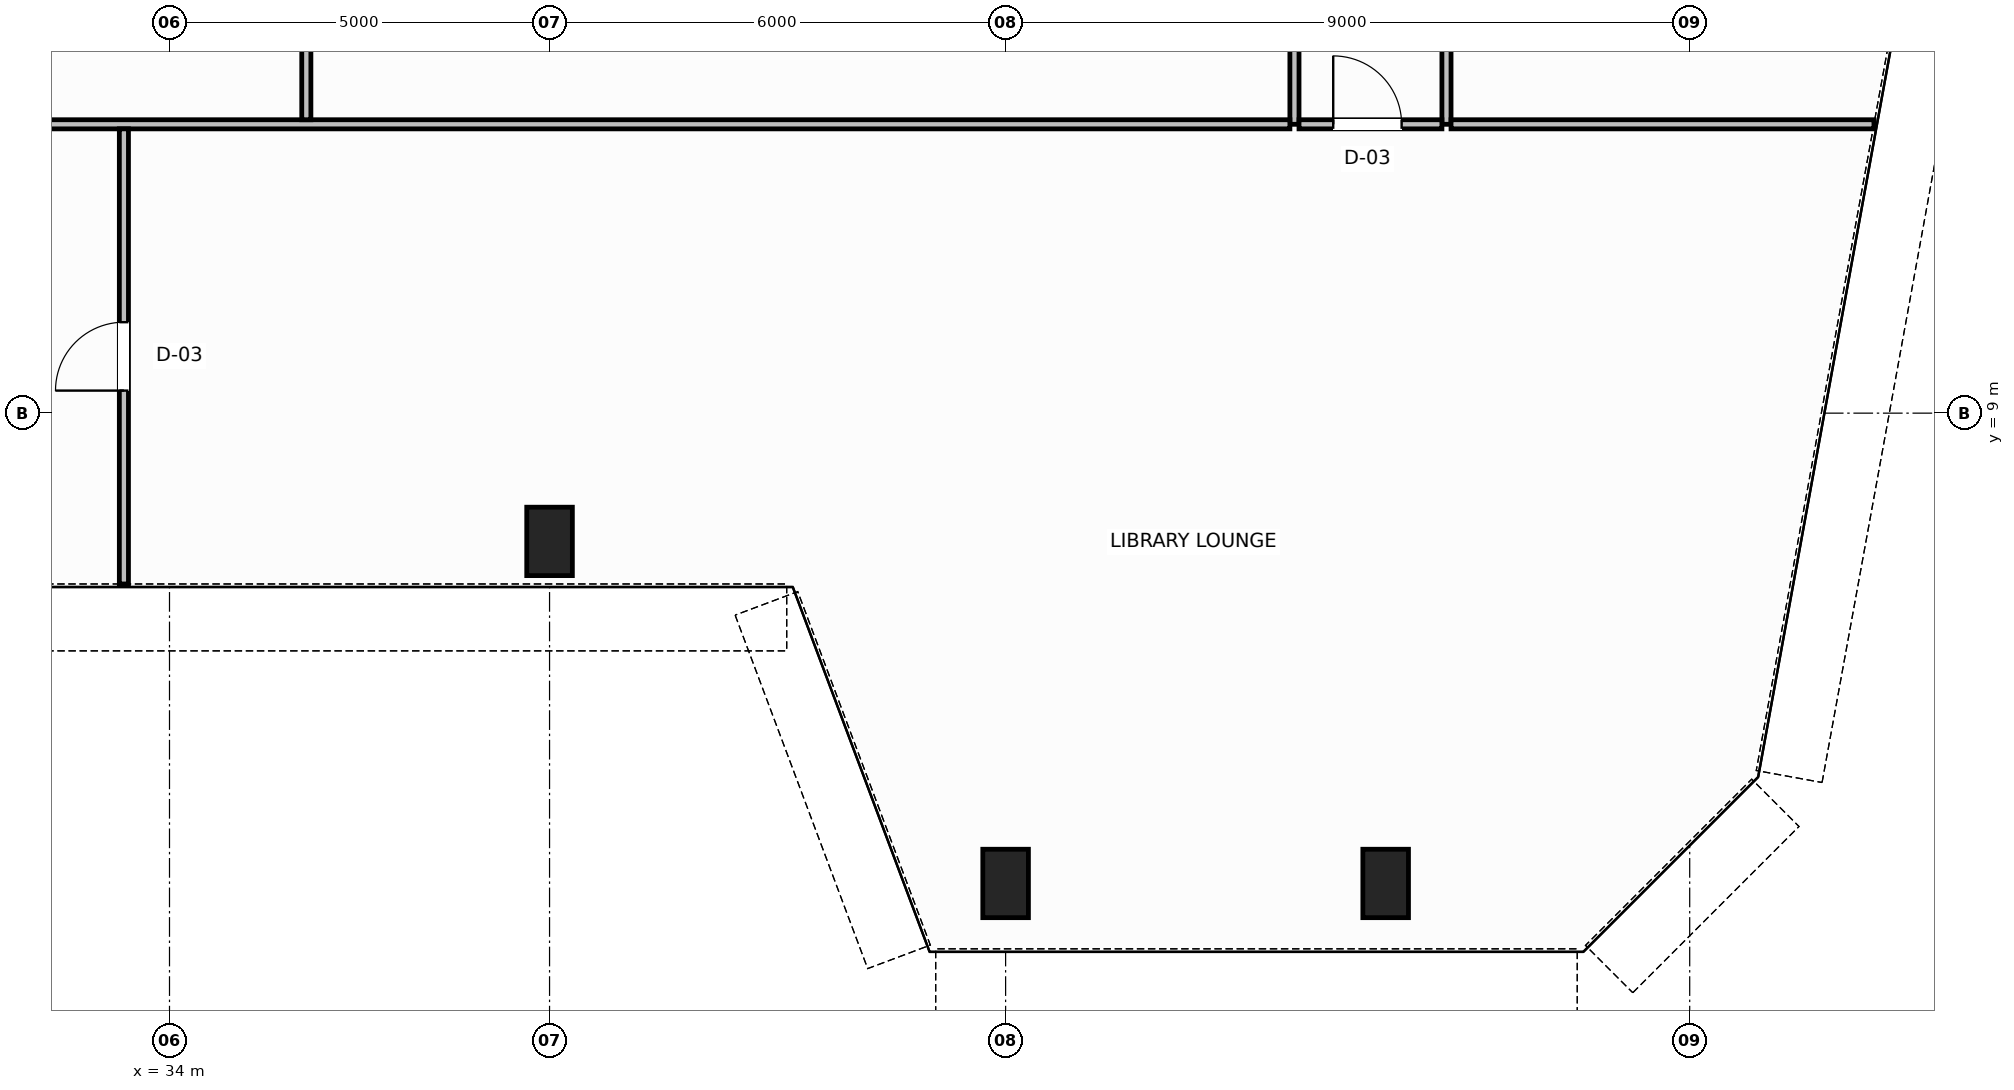
"""IFC4 building model, lengths in metres.
Left out: names, types, materials, properties, quantities, classifications, styles, units other than length and angle.
Written with IfcOpenShell. Run it as: python <this file> out.ifc"""

import sys

from ifc_helpers import new_model, si_unit, direction, frame, frame_2d, origin, origin_2d, place, context, subcontext, project, spatial, rectangle, hollow_rectangle, extrude, source, transform, mapped, element, fill, save


model = new_model("IFC4")
c1 = context("Model", 3, precision=1e-05, world=origin(), true_north=direction((0.0, 1.0)))
c2 = subcontext(c1, "Body", "Model", "MODEL_VIEW")
j1 = project(units=[si_unit("LENGTHUNIT", "METRE"), si_unit("PLANEANGLEUNIT", "RADIAN")], contexts=[c1])
p1 = place(None, origin())
s1 = spatial("IfcSite", under=j1, at=p1, CompositionType="ELEMENT")
p2 = place(p1, origin())
s2 = spatial("IfcBuilding", under=s1, at=p2, CompositionType="ELEMENT")
p3 = place(p2, frame((0.0, 0.0, 49.2)))
s3 = spatial("IfcBuildingStorey", under=s2, at=p3, CompositionType="ELEMENT", Elevation=49.2)
m1 = source(origin(), c2, "Body", "SweptSolid", [
    extrude(hollow_rectangle(XDim=0.6, YDim=0.9, WallThickness=0.04, InnerFilletRadius=0.04, OuterFilletRadius=0.08, at=origin_2d()), origin(), (0.0, 0.0, 1.0), 3.744),
])
for number, where, z_axis, x_axis in (
    (1, (39.0, 7.312, 0.032), (0.0, 0.064, 0.998), (-1.0, 0.0, 0.0)),
    (2, (45.0, 2.812, 0.032), (0.0, 0.064, 0.998), (-1.0, 0.0, 0.0)),
    (3, (50.0, 2.812, 0.032), (0.0, 0.064, 0.998), (-1.0, 0.0, 0.0)),
):
    element("IfcColumn", number, at=place(p3, frame(where, z_axis=z_axis, x_axis=x_axis)), inside=s3, PredefinedType="COLUMN", context=c2, shape_type="MappedRepresentation", body=[
        mapped(m1, transform((0.0, 0.0, 0.0), scale=1.0)),
    ])
p4 = place(p3, frame((48.8, 12.8, 0.0), z_axis=(0.0, 0.0, 1.0), x_axis=(0.0, 1.0, 0.0)))
e4 = element("IfcWall", 4, at=p4, inside=s3, PredefinedType="PARTITIONING", context=c2, shape_type="SweptSolid", body=[
    extrude(rectangle(XDim=21.24, YDim=0.12, at=frame_2d((10.62, 0.0))), origin(), (0.0, 0.0, 1.0), 3.58),
])
p5 = place(p3, frame((50.8, 12.8, 0.0), z_axis=(0.0, 0.0, 1.0), x_axis=(0.0, 1.0, 0.0)))
e5 = element("IfcWall", 5, at=p5, inside=s3, PredefinedType="PARTITIONING", context=c2, shape_type="SweptSolid", body=[
    extrude(rectangle(XDim=21.24, YDim=0.12, at=frame_2d((10.62, 0.0))), origin(), (0.0, 0.0, 1.0), 3.58),
])
p6 = place(p5, frame((3.45, 0.0, 0.0)))
e6 = element("IfcOpeningElement", 6, at=p6, cuts=e5, PredefinedType="OPENING", context=c2, shape_type="SweptSolid", body=[
    extrude(rectangle(XDim=0.9, YDim=2.15, at=frame_2d((0.45, 1.075))), frame((0.0, 0.07, 0.0), z_axis=(0.0, -1.0, 0.0), x_axis=(1.0, 0.0, 0.0)), (0.0, 0.0, 1.0), 0.14),
])
p7 = place(p5, frame((11.95, 0.0, 0.0)))
e7 = element("IfcOpeningElement", 7, at=p7, cuts=e5, PredefinedType="OPENING", context=c2, shape_type="SweptSolid", body=[
    extrude(rectangle(XDim=0.9, YDim=2.15, at=frame_2d((0.45, 1.075))), frame((0.0, 0.07, 0.0), z_axis=(0.0, -1.0, 0.0), x_axis=(1.0, 0.0, 0.0)), (0.0, 0.0, 1.0), 0.14),
])
p8 = place(p5, frame((18.67, 0.0, 0.0)))
e8 = element("IfcOpeningElement", 8, at=p8, cuts=e5, PredefinedType="OPENING", context=c2, shape_type="SweptSolid", body=[
    extrude(rectangle(XDim=0.9, YDim=2.15, at=frame_2d((0.45, 1.075))), frame((0.0, 0.07, 0.0), z_axis=(0.0, -1.0, 0.0), x_axis=(1.0, 0.0, 0.0)), (0.0, 0.0, 1.0), 0.14),
])
p9 = place(p3, frame((48.86, 12.8, 0.0), z_axis=(0.0, 0.0, 1.0), x_axis=(1.0, 0.0, 0.0)))
e9 = element("IfcWall", 9, at=p9, inside=s3, PredefinedType="PARTITIONING", context=c2, shape_type="SweptSolid", body=[
    extrude(rectangle(XDim=1.88, YDim=0.12, at=frame_2d((0.94, 0.0))), origin(), (0.0, 0.0, 1.0), 3.58),
])
p10 = place(p9, frame((0.45, 0.0, 0.0)))
e10 = element("IfcOpeningElement", 10, at=p10, cuts=e9, PredefinedType="OPENING", context=c2, shape_type="SweptSolid", body=[
    extrude(rectangle(XDim=0.9, YDim=2.15, at=frame_2d((0.45, 1.075))), frame((0.0, 0.07, 0.0), z_axis=(0.0, -1.0, 0.0), x_axis=(1.0, 0.0, 0.0)), (0.0, 0.0, 1.0), 0.14),
])
p11 = place(p3, frame((50.86, 12.8, 0.0), z_axis=(0.0, 0.0, 1.0), x_axis=(1.0, 0.0, 0.0)))
e11 = element("IfcWall", 11, at=p11, inside=s3, PredefinedType="PARTITIONING", context=c2, shape_type="SweptSolid", body=[
    extrude(rectangle(XDim=5.564, YDim=0.12, at=frame_2d((2.782, 0.0))), origin(), (0.0, 0.0, 1.0), 3.58),
])
p12 = place(p3, frame((19.26, 12.8, 0.0), z_axis=(0.0, 0.0, 1.0), x_axis=(1.0, 0.0, 0.0)))
e12 = element("IfcWall", 12, at=p12, inside=s3, PredefinedType="PARTITIONING", context=c2, shape_type="SweptSolid", body=[
    extrude(rectangle(XDim=29.48, YDim=0.12, at=frame_2d((14.74, 0.0))), origin(), (0.0, 0.0, 1.0), 3.58),
])
p13 = place(p3, frame((35.8, 12.86, 0.0), z_axis=(0.0, 0.0, 1.0), x_axis=(0.0, 1.0, 0.0)))
e13 = element("IfcWall", 13, at=p13, inside=s3, PredefinedType="PARTITIONING", context=c2, shape_type="SweptSolid", body=[
    extrude(rectangle(XDim=21.18, YDim=0.12, at=frame_2d((10.59, 0.0))), origin(), (0.0, 0.0, 1.0), 3.58),
])
p14 = place(p3, frame((33.4, 6.753, 0.0), z_axis=(0.0, 0.0, 1.0), x_axis=(0.0, 1.0, 0.0)))
e14 = element("IfcWall", 14, at=p14, inside=s3, PredefinedType="PARTITIONING", context=c2, shape_type="SweptSolid", body=[
    extrude(rectangle(XDim=5.987, YDim=0.12, at=frame_2d((2.994, 0.0))), origin(), (0.0, 0.0, 1.0), 3.58),
])
p15 = place(p14, frame((2.544, 0.0, 0.0)))
e15 = element("IfcOpeningElement", 15, at=p15, cuts=e14, PredefinedType="OPENING", context=c2, shape_type="SweptSolid", body=[
    extrude(rectangle(XDim=0.9, YDim=2.15, at=frame_2d((0.45, 1.075))), frame((0.0, 0.07, 0.0), z_axis=(0.0, -1.0, 0.0), x_axis=(1.0, 0.0, 0.0)), (0.0, 0.0, 1.0), 0.14),
])
m2 = source(origin(), c2, "Body", "SweptSolid", [
    extrude(rectangle(XDim=0.9, YDim=2.15, at=frame_2d((0.45, 1.075))), frame((0.0, 0.025, 0.0), z_axis=(0.0, -1.0, 0.0), x_axis=(1.0, 0.0, 0.0)), (0.0, 0.0, 1.0), 0.05),
])
p16 = place(p15, origin())
e16 = element("IfcDoor", 16, at=p16, inside=s3, OperationType="SINGLE_SWING_RIGHT", PredefinedType="DOOR", context=c2, shape_type="MappedRepresentation", body=[
    mapped(m2, transform((0.0, 0.0, 0.0), scale=1.0)),
])
fill(e15, e16)
p17 = place(p10, origin())
e17 = element("IfcDoor", 17, at=p17, inside=s3, OperationType="SINGLE_SWING_RIGHT", PredefinedType="DOOR", context=c2, shape_type="MappedRepresentation", body=[
    mapped(m2, transform((0.0, 0.0, 0.0), scale=1.0)),
])
fill(e10, e17)
save(model, sys.argv[1])
